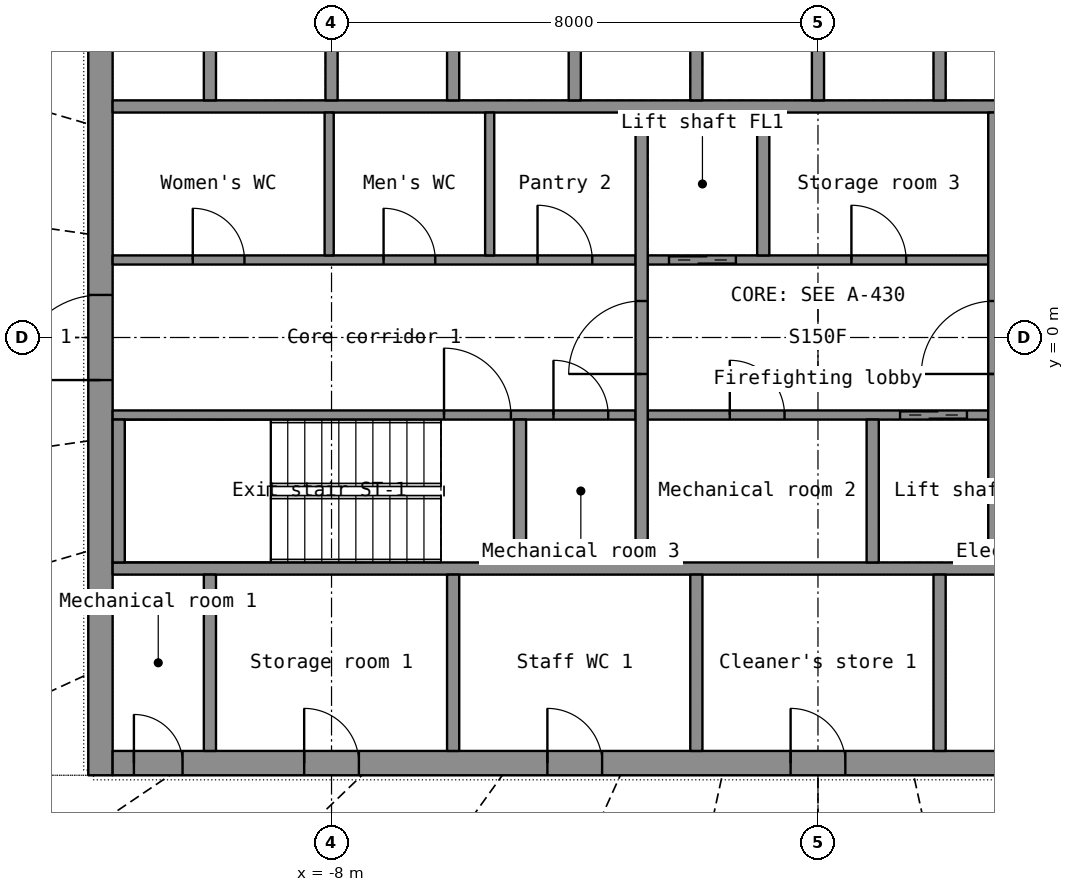
"""IFC4 building model, lengths in metres.
Left out: names, types, materials, properties, quantities, classifications, styles, units other than length and angle.
Written with IfcOpenShell. Run it as: python <this file> out.ifc"""

import sys

from ifc_helpers import new_model, si_unit, direction, frame, frame_2d, origin, place, context, subcontext, project, spatial, rectangle, extrude, element, fill, save


model = new_model("IFC4")
c1 = context("Model", 3, precision=1e-05, world=origin(), true_north=direction((0.0, 1.0)))
c2 = subcontext(c1, "Body", "Model", "MODEL_VIEW")
j1 = project(units=[si_unit("LENGTHUNIT", "METRE"), si_unit("PLANEANGLEUNIT", "RADIAN")], contexts=[c1])
p1 = place(None, origin())
s1 = spatial("IfcSite", under=j1, at=p1, CompositionType="ELEMENT")
p2 = place(p1, origin())
s2 = spatial("IfcBuilding", under=s1, at=p2, CompositionType="ELEMENT")
p3 = place(p2, frame((0.0, 0.0, 231.9)))
s3 = spatial("IfcBuildingStorey", under=s2, at=p3, CompositionType="ELEMENT", Elevation=231.9)
p4 = place(p3, frame((-11.8, -7.2, 0.0), z_axis=(0.0, 0.0, 1.0), x_axis=(0.0, 1.0, 0.0)))
e1 = element("IfcWall", 1, at=p4, inside=s3, PredefinedType="SHEAR", context=c2, shape_type="SweptSolid", body=[
    extrude(rectangle(XDim=14.4, YDim=0.4, at=frame_2d((7.2, 0.0))), origin(), (0.0, 0.0, 1.0), 3.3),
])
p5 = place(p4, frame((6.5, 0.0, 0.0)))
e2 = element("IfcOpeningElement", 2, at=p5, cuts=e1, PredefinedType="OPENING", context=c2, shape_type="SweptSolid", body=[
    extrude(rectangle(XDim=1.4, YDim=2.2, at=frame_2d((0.7, 1.1))), frame((0.0, 0.21, 0.0), z_axis=(0.0, -1.0, 0.0), x_axis=(1.0, 0.0, 0.0)), (0.0, 0.0, 1.0), 0.42),
])
p6 = place(p3, frame((-11.6, -7.0, 0.0), z_axis=(0.0, 0.0, 1.0), x_axis=(1.0, 0.0, 0.0)))
e3 = element("IfcWall", 3, at=p6, inside=s3, PredefinedType="SHEAR", context=c2, shape_type="SweptSolid", body=[
    extrude(rectangle(XDim=23.2, YDim=0.4, at=frame_2d((11.6, 0.0))), origin(), (0.0, 0.0, 1.0), 3.3),
])
p7 = place(p6, frame((20.05, 0.0, 0.0)))
e4 = element("IfcOpeningElement", 4, at=p7, cuts=e3, PredefinedType="OPENING", context=c2, shape_type="SweptSolid", body=[
    extrude(rectangle(XDim=1.1, YDim=2.2, at=frame_2d((0.55, 1.1))), frame((0.0, 0.21, 0.0), z_axis=(0.0, -1.0, 0.0), x_axis=(1.0, 0.0, 0.0)), (0.0, 0.0, 1.0), 0.42),
])
p8 = place(p6, frame((3.15, 0.0, 0.0)))
e5 = element("IfcOpeningElement", 5, at=p8, cuts=e3, PredefinedType="OPENING", context=c2, shape_type="SweptSolid", body=[
    extrude(rectangle(XDim=0.9, YDim=2.1, at=frame_2d((0.45, 1.05))), frame((0.0, 0.21, 0.0), z_axis=(0.0, -1.0, 0.0), x_axis=(1.0, 0.0, 0.0)), (0.0, 0.0, 1.0), 0.42),
])
p9 = place(p6, frame((7.15, 0.0, 0.0)))
e6 = element("IfcOpeningElement", 6, at=p9, cuts=e3, PredefinedType="OPENING", context=c2, shape_type="SweptSolid", body=[
    extrude(rectangle(XDim=0.9, YDim=2.1, at=frame_2d((0.45, 1.05))), frame((0.0, 0.21, 0.0), z_axis=(0.0, -1.0, 0.0), x_axis=(1.0, 0.0, 0.0)), (0.0, 0.0, 1.0), 0.42),
])
p10 = place(p6, frame((11.15, 0.0, 0.0)))
e7 = element("IfcOpeningElement", 7, at=p10, cuts=e3, PredefinedType="OPENING", context=c2, shape_type="SweptSolid", body=[
    extrude(rectangle(XDim=0.9, YDim=2.1, at=frame_2d((0.45, 1.05))), frame((0.0, 0.21, 0.0), z_axis=(0.0, -1.0, 0.0), x_axis=(1.0, 0.0, 0.0)), (0.0, 0.0, 1.0), 0.42),
])
p11 = place(p6, frame((16.15, 0.0, 0.0)))
e8 = element("IfcOpeningElement", 8, at=p11, cuts=e3, PredefinedType="OPENING", context=c2, shape_type="SweptSolid", body=[
    extrude(rectangle(XDim=0.9, YDim=2.1, at=frame_2d((0.45, 1.05))), frame((0.0, 0.21, 0.0), z_axis=(0.0, -1.0, 0.0), x_axis=(1.0, 0.0, 0.0)), (0.0, 0.0, 1.0), 0.42),
])
p12 = place(p6, frame((0.35, 0.0, 0.0)))
e9 = element("IfcOpeningElement", 9, at=p12, cuts=e3, PredefinedType="OPENING", context=c2, shape_type="SweptSolid", body=[
    extrude(rectangle(XDim=0.8, YDim=2.05, at=frame_2d((0.4, 1.025))), frame((0.0, 0.21, 0.0), z_axis=(0.0, -1.0, 0.0), x_axis=(1.0, 0.0, 0.0)), (0.0, 0.0, 1.0), 0.42),
])
p13 = place(p6, frame((22.05, 0.0, 0.0)))
e10 = element("IfcOpeningElement", 10, at=p13, cuts=e3, PredefinedType="OPENING", context=c2, shape_type="SweptSolid", body=[
    extrude(rectangle(XDim=0.8, YDim=2.05, at=frame_2d((0.4, 1.025))), frame((0.0, 0.21, 0.0), z_axis=(0.0, -1.0, 0.0), x_axis=(1.0, 0.0, 0.0)), (0.0, 0.0, 1.0), 0.42),
])
for number, where, z_axis, x_axis in (
    (11, (-11.6, -3.8, 0.0), (0.0, 0.0, 1.0), (1.0, 0.0, 0.0)),
    (12, (-11.6, 3.8, 0.0), (0.0, 0.0, 1.0), (1.0, 0.0, 0.0)),
):
    element("IfcWall", number, at=place(p3, frame(where, z_axis=z_axis, x_axis=x_axis)), inside=s3, PredefinedType="SHEAR", context=c2, shape_type="SweptSolid", body=[
        extrude(rectangle(XDim=23.2, YDim=0.2, at=frame_2d((11.6, 0.0))), origin(), (0.0, 0.0, 1.0), 3.3),
    ])
p14 = place(p3, frame((-10.0, -6.8, 0.0), z_axis=(0.0, 0.0, 1.0), x_axis=(0.0, 1.0, 0.0)))
e13 = element("IfcWall", 13, at=p14, inside=s3, PredefinedType="SHEAR", context=c2, shape_type="SweptSolid", body=[
    extrude(rectangle(XDim=2.9, YDim=0.2, at=frame_2d((1.45, 0.0))), origin(), (0.0, 0.0, 1.0), 3.3),
])
for number, where, z_axis, x_axis in (
    (14, (-6.0, -6.8, 0.0), (0.0, 0.0, 1.0), (0.0, 1.0, 0.0)),
    (15, (-2.0, -6.8, 0.0), (0.0, 0.0, 1.0), (0.0, 1.0, 0.0)),
    (16, (2.0, -6.8, 0.0), (0.0, 0.0, 1.0), (0.0, 1.0, 0.0)),
):
    element("IfcWall", number, at=place(p3, frame(where, z_axis=z_axis, x_axis=x_axis)), inside=s3, PredefinedType="PARTITIONING", context=c2, shape_type="SweptSolid", body=[
        extrude(rectangle(XDim=2.9, YDim=0.2, at=frame_2d((1.45, 0.0))), origin(), (0.0, 0.0, 1.0), 3.3),
    ])
for number, where, z_axis, x_axis in (
    (17, (-10.0, 3.9, 0.0), (0.0, 0.0, 1.0), (0.0, 1.0, 0.0)),
    (18, (-8.0, 3.9, 0.0), (0.0, 0.0, 1.0), (0.0, 1.0, 0.0)),
    (19, (-6.0, 3.9, 0.0), (0.0, 0.0, 1.0), (0.0, 1.0, 0.0)),
    (20, (-4.0, 3.9, 0.0), (0.0, 0.0, 1.0), (0.0, 1.0, 0.0)),
    (21, (-2.0, 3.9, 0.0), (0.0, 0.0, 1.0), (0.0, 1.0, 0.0)),
    (22, (0.0, 3.9, 0.0), (0.0, 0.0, 1.0), (0.0, 1.0, 0.0)),
    (23, (2.0, 3.9, 0.0), (0.0, 0.0, 1.0), (0.0, 1.0, 0.0)),
):
    element("IfcWall", number, at=place(p3, frame(where, z_axis=z_axis, x_axis=x_axis)), inside=s3, PredefinedType="SHEAR", context=c2, shape_type="SweptSolid", body=[
        extrude(rectangle(XDim=2.9, YDim=0.2, at=frame_2d((1.45, 0.0))), origin(), (0.0, 0.0, 1.0), 3.3),
    ])
p15 = place(p3, frame((-11.6, -1.275, 0.0), z_axis=(0.0, 0.0, 1.0), x_axis=(1.0, 0.0, 0.0)))
e24 = element("IfcWall", 24, at=p15, inside=s3, PredefinedType="SHEAR", context=c2, shape_type="SweptSolid", body=[
    extrude(rectangle(XDim=8.6, YDim=0.15, at=frame_2d((4.3, 0.0))), origin(), (0.0, 0.0, 1.0), 3.3),
])
p16 = place(p15, frame((5.45, 0.0, 0.0)))
e25 = element("IfcOpeningElement", 25, at=p16, cuts=e24, PredefinedType="OPENING", context=c2, shape_type="SweptSolid", body=[
    extrude(rectangle(XDim=1.1, YDim=2.15, at=frame_2d((0.55, 1.075))), frame((0.0, 0.085, 0.0), z_axis=(0.0, -1.0, 0.0), x_axis=(1.0, 0.0, 0.0)), (0.0, 0.0, 1.0), 0.17),
])
p17 = place(p15, frame((7.25, 0.0, 0.0)))
e26 = element("IfcOpeningElement", 26, at=p17, cuts=e24, PredefinedType="OPENING", context=c2, shape_type="SweptSolid", body=[
    extrude(rectangle(XDim=0.9, YDim=2.1, at=frame_2d((0.45, 1.05))), frame((0.0, 0.085, 0.0), z_axis=(0.0, -1.0, 0.0), x_axis=(1.0, 0.0, 0.0)), (0.0, 0.0, 1.0), 0.17),
])
p18 = place(p3, frame((-2.8, -1.275, 0.0), z_axis=(0.0, 0.0, 1.0), x_axis=(1.0, 0.0, 0.0)))
e27 = element("IfcWall", 27, at=p18, inside=s3, PredefinedType="SHEAR", context=c2, shape_type="SweptSolid", body=[
    extrude(rectangle(XDim=5.6, YDim=0.15, at=frame_2d((2.8, 0.0))), origin(), (0.0, 0.0, 1.0), 3.3),
])
p19 = place(p18, frame((4.15, 0.0, 0.0)))
e28 = element("IfcOpeningElement", 28, at=p19, cuts=e27, PredefinedType="OPENING", context=c2, shape_type="SweptSolid", body=[
    extrude(rectangle(XDim=1.1, YDim=2.2, at=frame_2d((0.55, 1.1))), frame((0.0, 0.085, 0.0), z_axis=(0.0, -1.0, 0.0), x_axis=(1.0, 0.0, 0.0)), (0.0, 0.0, 1.0), 0.17),
])
p20 = place(p18, frame((1.35, 0.0, 0.0)))
e29 = element("IfcOpeningElement", 29, at=p20, cuts=e27, PredefinedType="OPENING", context=c2, shape_type="SweptSolid", body=[
    extrude(rectangle(XDim=0.9, YDim=2.1, at=frame_2d((0.45, 1.05))), frame((0.0, 0.085, 0.0), z_axis=(0.0, -1.0, 0.0), x_axis=(1.0, 0.0, 0.0)), (0.0, 0.0, 1.0), 0.17),
])
p21 = place(p3, frame((-11.6, 1.275, 0.0), z_axis=(0.0, 0.0, 1.0), x_axis=(1.0, 0.0, 0.0)))
e30 = element("IfcWall", 30, at=p21, inside=s3, PredefinedType="PARTITIONING", context=c2, shape_type="SweptSolid", body=[
    extrude(rectangle(XDim=8.6, YDim=0.15, at=frame_2d((4.3, 0.0))), origin(), (0.0, 0.0, 1.0), 3.3),
])
p22 = place(p21, frame((1.318, 0.0, 0.0)))
e31 = element("IfcOpeningElement", 31, at=p22, cuts=e30, PredefinedType="OPENING", context=c2, shape_type="SweptSolid", body=[
    extrude(rectangle(XDim=0.85, YDim=2.1, at=frame_2d((0.425, 1.05))), frame((0.0, 0.085, 0.0), z_axis=(0.0, -1.0, 0.0), x_axis=(1.0, 0.0, 0.0)), (0.0, 0.0, 1.0), 0.17),
])
p23 = place(p21, frame((4.456, 0.0, 0.0)))
e32 = element("IfcOpeningElement", 32, at=p23, cuts=e30, PredefinedType="OPENING", context=c2, shape_type="SweptSolid", body=[
    extrude(rectangle(XDim=0.85, YDim=2.1, at=frame_2d((0.425, 1.05))), frame((0.0, 0.085, 0.0), z_axis=(0.0, -1.0, 0.0), x_axis=(1.0, 0.0, 0.0)), (0.0, 0.0, 1.0), 0.17),
])
p24 = place(p21, frame((6.988, 0.0, 0.0)))
e33 = element("IfcOpeningElement", 33, at=p24, cuts=e30, PredefinedType="OPENING", context=c2, shape_type="SweptSolid", body=[
    extrude(rectangle(XDim=0.9, YDim=2.1, at=frame_2d((0.45, 1.05))), frame((0.0, 0.085, 0.0), z_axis=(0.0, -1.0, 0.0), x_axis=(1.0, 0.0, 0.0)), (0.0, 0.0, 1.0), 0.17),
])
p25 = place(p3, frame((-2.8, 1.275, 0.0), z_axis=(0.0, 0.0, 1.0), x_axis=(1.0, 0.0, 0.0)))
e34 = element("IfcWall", 34, at=p25, inside=s3, PredefinedType="SHEAR", context=c2, shape_type="SweptSolid", body=[
    extrude(rectangle(XDim=5.6, YDim=0.15, at=frame_2d((2.8, 0.0))), origin(), (0.0, 0.0, 1.0), 3.3),
])
p26 = place(p25, frame((0.35, 0.0, 0.0)))
e35 = element("IfcOpeningElement", 35, at=p26, cuts=e34, PredefinedType="OPENING", context=c2, shape_type="SweptSolid", body=[
    extrude(rectangle(XDim=1.1, YDim=2.2, at=frame_2d((0.55, 1.1))), frame((0.0, 0.085, 0.0), z_axis=(0.0, -1.0, 0.0), x_axis=(1.0, 0.0, 0.0)), (0.0, 0.0, 1.0), 0.17),
])
p27 = place(p25, frame((3.35, 0.0, 0.0)))
e36 = element("IfcOpeningElement", 36, at=p27, cuts=e34, PredefinedType="OPENING", context=c2, shape_type="SweptSolid", body=[
    extrude(rectangle(XDim=0.9, YDim=2.1, at=frame_2d((0.45, 1.05))), frame((0.0, 0.085, 0.0), z_axis=(0.0, -1.0, 0.0), x_axis=(1.0, 0.0, 0.0)), (0.0, 0.0, 1.0), 0.17),
])
p28 = place(p3, frame((-2.9, -3.7, 0.0), z_axis=(0.0, 0.0, 1.0), x_axis=(0.0, 1.0, 0.0)))
e37 = element("IfcWall", 37, at=p28, inside=s3, PredefinedType="SHEAR", context=c2, shape_type="SweptSolid", body=[
    extrude(rectangle(XDim=7.4, YDim=0.2, at=frame_2d((3.7, 0.0))), origin(), (0.0, 0.0, 1.0), 3.3),
])
p29 = place(p28, frame((3.1, 0.0, 0.0)))
e38 = element("IfcOpeningElement", 38, at=p29, cuts=e37, PredefinedType="OPENING", context=c2, shape_type="SweptSolid", body=[
    extrude(rectangle(XDim=1.2, YDim=2.2, at=frame_2d((0.6, 1.1))), frame((0.0, 0.11, 0.0), z_axis=(0.0, -1.0, 0.0), x_axis=(1.0, 0.0, 0.0)), (0.0, 0.0, 1.0), 0.22),
])
p30 = place(p3, frame((2.9, -3.7, 0.0), z_axis=(0.0, 0.0, 1.0), x_axis=(0.0, 1.0, 0.0)))
e39 = element("IfcWall", 39, at=p30, inside=s3, PredefinedType="SHEAR", context=c2, shape_type="SweptSolid", body=[
    extrude(rectangle(XDim=7.4, YDim=0.2, at=frame_2d((3.7, 0.0))), origin(), (0.0, 0.0, 1.0), 3.3),
])
p31 = place(p30, frame((3.1, 0.0, 0.0)))
e40 = element("IfcOpeningElement", 40, at=p31, cuts=e39, PredefinedType="OPENING", context=c2, shape_type="SweptSolid", body=[
    extrude(rectangle(XDim=1.2, YDim=2.2, at=frame_2d((0.6, 1.1))), frame((0.0, 0.11, 0.0), z_axis=(0.0, -1.0, 0.0), x_axis=(1.0, 0.0, 0.0)), (0.0, 0.0, 1.0), 0.22),
])
for number, where, z_axis, x_axis in (
    (41, (-0.9, 1.35, 0.0), (0.0, 0.0, 1.0), (0.0, 1.0, 0.0)),
    (42, (0.9, -3.7, 0.0), (0.0, 0.0, 1.0), (0.0, 1.0, 0.0)),
    (43, (-11.5, -3.7, 0.0), (0.0, 0.0, 1.0), (0.0, 1.0, 0.0)),
    (44, (-4.9, -3.7, 0.0), (0.0, 0.0, 1.0), (0.0, 1.0, 0.0)),
):
    element("IfcWall", number, at=place(p3, frame(where, z_axis=z_axis, x_axis=x_axis)), inside=s3, PredefinedType="SHEAR", context=c2, shape_type="SweptSolid", body=[
        extrude(rectangle(XDim=2.35, YDim=0.2, at=frame_2d((1.175, 0.0))), origin(), (0.0, 0.0, 1.0), 3.3),
    ])
for number, where, z_axis, x_axis in (
    (45, (-8.039, 1.35, 0.0), (0.0, 0.0, 1.0), (0.0, 1.0, 0.0)),
    (46, (-5.399, 1.35, 0.0), (0.0, 0.0, 1.0), (0.0, 1.0, 0.0)),
):
    element("IfcWall", number, at=place(p3, frame(where, z_axis=z_axis, x_axis=x_axis)), inside=s3, PredefinedType="PARTITIONING", context=c2, shape_type="SweptSolid", body=[
        extrude(rectangle(XDim=2.35, YDim=0.15, at=frame_2d((1.175, 0.0))), origin(), (0.0, 0.0, 1.0), 3.3),
    ])
p32 = place(p8, origin())
e47 = element("IfcDoor", 47, at=p32, inside=s3, OperationType="SINGLE_SWING_LEFT", PredefinedType="DOOR", context=c2, shape_type="SweptSolid", body=[
    extrude(rectangle(XDim=0.9, YDim=2.1, at=frame_2d((0.45, 1.05))), frame((0.0, 0.025, 0.0), z_axis=(0.0, -1.0, 0.0), x_axis=(1.0, 0.0, 0.0)), (0.0, 0.0, 1.0), 0.05),
])
fill(e5, e47)
p33 = place(p9, origin())
e48 = element("IfcDoor", 48, at=p33, inside=s3, OperationType="SINGLE_SWING_LEFT", PredefinedType="DOOR", context=c2, shape_type="SweptSolid", body=[
    extrude(rectangle(XDim=0.9, YDim=2.1, at=frame_2d((0.45, 1.05))), frame((0.0, 0.025, 0.0), z_axis=(0.0, -1.0, 0.0), x_axis=(1.0, 0.0, 0.0)), (0.0, 0.0, 1.0), 0.05),
])
fill(e6, e48)
p34 = place(p10, origin())
e49 = element("IfcDoor", 49, at=p34, inside=s3, OperationType="SINGLE_SWING_LEFT", PredefinedType="DOOR", context=c2, shape_type="SweptSolid", body=[
    extrude(rectangle(XDim=0.9, YDim=2.1, at=frame_2d((0.45, 1.05))), frame((0.0, 0.025, 0.0), z_axis=(0.0, -1.0, 0.0), x_axis=(1.0, 0.0, 0.0)), (0.0, 0.0, 1.0), 0.05),
])
fill(e7, e49)
p35 = place(p12, origin())
e50 = element("IfcDoor", 50, at=p35, inside=s3, OperationType="SINGLE_SWING_LEFT", PredefinedType="DOOR", context=c2, shape_type="SweptSolid", body=[
    extrude(rectangle(XDim=0.8, YDim=2.05, at=frame_2d((0.4, 1.025))), frame((0.0, 0.025, 0.0), z_axis=(0.0, -1.0, 0.0), x_axis=(1.0, 0.0, 0.0)), (0.0, 0.0, 1.0), 0.05),
])
fill(e9, e50)
p36 = place(p5, origin())
e51 = element("IfcDoor", 51, at=p36, inside=s3, OperationType="DOUBLE_DOOR_SINGLE_SWING", PredefinedType="DOOR", context=c2, shape_type="SweptSolid", body=[
    extrude(rectangle(XDim=1.4, YDim=2.2, at=frame_2d((0.7, 1.1))), frame((0.0, 0.025, 0.0), z_axis=(0.0, -1.0, 0.0), x_axis=(1.0, 0.0, 0.0)), (0.0, 0.0, 1.0), 0.05),
])
fill(e2, e51)
p37 = place(p29, origin())
e52 = element("IfcDoor", 52, at=p37, inside=s3, OperationType="SINGLE_SWING_LEFT", PredefinedType="DOOR", context=c2, shape_type="SweptSolid", body=[
    extrude(rectangle(XDim=1.2, YDim=2.2, at=frame_2d((0.6, 1.1))), frame((0.0, 0.025, 0.0), z_axis=(0.0, -1.0, 0.0), x_axis=(1.0, 0.0, 0.0)), (0.0, 0.0, 1.0), 0.05),
])
fill(e38, e52)
p38 = place(p31, origin())
e53 = element("IfcDoor", 53, at=p38, inside=s3, OperationType="SINGLE_SWING_LEFT", PredefinedType="DOOR", context=c2, shape_type="SweptSolid", body=[
    extrude(rectangle(XDim=1.2, YDim=2.2, at=frame_2d((0.6, 1.1))), frame((0.0, 0.025, 0.0), z_axis=(0.0, -1.0, 0.0), x_axis=(1.0, 0.0, 0.0)), (0.0, 0.0, 1.0), 0.05),
])
fill(e40, e53)
p39 = place(p26, origin())
e54 = element("IfcDoor", 54, at=p39, inside=s3, OperationType="DOUBLE_DOOR_SLIDING", PredefinedType="DOOR", context=c2, shape_type="SweptSolid", body=[
    extrude(rectangle(XDim=1.1, YDim=2.2, at=frame_2d((0.55, 1.1))), frame((0.0, 0.025, 0.0), z_axis=(0.0, -1.0, 0.0), x_axis=(1.0, 0.0, 0.0)), (0.0, 0.0, 1.0), 0.05),
])
fill(e35, e54)
p40 = place(p19, origin())
e55 = element("IfcDoor", 55, at=p40, inside=s3, OperationType="DOUBLE_DOOR_SLIDING", PredefinedType="DOOR", context=c2, shape_type="SweptSolid", body=[
    extrude(rectangle(XDim=1.1, YDim=2.2, at=frame_2d((0.55, 1.1))), frame((0.0, 0.025, 0.0), z_axis=(0.0, -1.0, 0.0), x_axis=(1.0, 0.0, 0.0)), (0.0, 0.0, 1.0), 0.05),
])
fill(e28, e55)
p41 = place(p16, origin())
e56 = element("IfcDoor", 56, at=p41, inside=s3, OperationType="SINGLE_SWING_LEFT", PredefinedType="DOOR", context=c2, shape_type="SweptSolid", body=[
    extrude(rectangle(XDim=1.1, YDim=2.15, at=frame_2d((0.55, 1.075))), frame((0.0, 0.025, 0.0), z_axis=(0.0, -1.0, 0.0), x_axis=(1.0, 0.0, 0.0)), (0.0, 0.0, 1.0), 0.05),
])
fill(e25, e56)
p42 = place(p22, origin())
e57 = element("IfcDoor", 57, at=p42, inside=s3, OperationType="SINGLE_SWING_LEFT", PredefinedType="DOOR", context=c2, shape_type="SweptSolid", body=[
    extrude(rectangle(XDim=0.85, YDim=2.1, at=frame_2d((0.425, 1.05))), frame((0.0, 0.025, 0.0), z_axis=(0.0, -1.0, 0.0), x_axis=(1.0, 0.0, 0.0)), (0.0, 0.0, 1.0), 0.05),
])
fill(e31, e57)
p43 = place(p23, origin())
e58 = element("IfcDoor", 58, at=p43, inside=s3, OperationType="SINGLE_SWING_LEFT", PredefinedType="DOOR", context=c2, shape_type="SweptSolid", body=[
    extrude(rectangle(XDim=0.85, YDim=2.1, at=frame_2d((0.425, 1.05))), frame((0.0, 0.025, 0.0), z_axis=(0.0, -1.0, 0.0), x_axis=(1.0, 0.0, 0.0)), (0.0, 0.0, 1.0), 0.05),
])
fill(e32, e58)
p44 = place(p24, origin())
e59 = element("IfcDoor", 59, at=p44, inside=s3, OperationType="SINGLE_SWING_LEFT", PredefinedType="DOOR", context=c2, shape_type="SweptSolid", body=[
    extrude(rectangle(XDim=0.9, YDim=2.1, at=frame_2d((0.45, 1.05))), frame((0.0, 0.025, 0.0), z_axis=(0.0, -1.0, 0.0), x_axis=(1.0, 0.0, 0.0)), (0.0, 0.0, 1.0), 0.05),
])
fill(e33, e59)
p45 = place(p27, origin())
e60 = element("IfcDoor", 60, at=p45, inside=s3, OperationType="SINGLE_SWING_LEFT", PredefinedType="DOOR", context=c2, shape_type="SweptSolid", body=[
    extrude(rectangle(XDim=0.9, YDim=2.1, at=frame_2d((0.45, 1.05))), frame((0.0, 0.025, 0.0), z_axis=(0.0, -1.0, 0.0), x_axis=(1.0, 0.0, 0.0)), (0.0, 0.0, 1.0), 0.05),
])
fill(e36, e60)
p46 = place(p20, origin())
e61 = element("IfcDoor", 61, at=p46, inside=s3, OperationType="SINGLE_SWING_LEFT", PredefinedType="DOOR", context=c2, shape_type="SweptSolid", body=[
    extrude(rectangle(XDim=0.9, YDim=2.1, at=frame_2d((0.45, 1.05))), frame((0.0, 0.025, 0.0), z_axis=(0.0, -1.0, 0.0), x_axis=(1.0, 0.0, 0.0)), (0.0, 0.0, 1.0), 0.05),
])
fill(e29, e61)
p47 = place(p17, origin())
e62 = element("IfcDoor", 62, at=p47, inside=s3, OperationType="SINGLE_SWING_LEFT", PredefinedType="DOOR", context=c2, shape_type="SweptSolid", body=[
    extrude(rectangle(XDim=0.9, YDim=2.1, at=frame_2d((0.45, 1.05))), frame((0.0, 0.025, 0.0), z_axis=(0.0, -1.0, 0.0), x_axis=(1.0, 0.0, 0.0)), (0.0, 0.0, 1.0), 0.05),
])
fill(e26, e62)
save(model, sys.argv[1])
